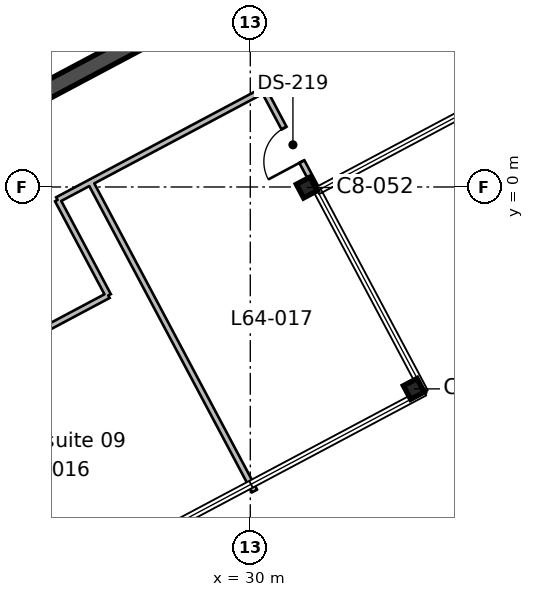
"""IFC4 building model, lengths in metres.
Left out: names, types, materials, properties, quantities, classifications, styles, units other than length and angle.
Written with IfcOpenShell. Run it as: python <this file> out.ifc"""

import sys

from ifc_helpers import new_model, si_unit, direction, frame, frame_2d, origin, origin_2d, place, context, subcontext, project, spatial, rectangle, i_section, extrude, element, fill, save


model = new_model("IFC4")
c1 = context("Model", 3, precision=1e-05, world=origin(), true_north=direction((0.0, 1.0)))
c2 = subcontext(c1, "Body", "Model", "MODEL_VIEW")
j1 = project(units=[si_unit("LENGTHUNIT", "METRE"), si_unit("PLANEANGLEUNIT", "RADIAN")], contexts=[c1])
p1 = place(None, origin())
s1 = spatial("IfcSite", under=j1, at=p1, CompositionType="ELEMENT")
p2 = place(p1, origin())
s2 = spatial("IfcBuilding", under=s1, at=p2, CompositionType="ELEMENT")
p3 = place(p2, frame((0.0, 0.0, 285.3)))
s3 = spatial("IfcBuildingStorey", under=s2, at=p3, CompositionType="ELEMENT", Elevation=285.3)
for number, where, z_axis, x_axis in (
    (1, (34.304, -5.312, 0.0), (0.0, 0.0, 1.0), (-0.469, 0.883, 0.0)),
    (2, (31.487, -0.014, 0.0), (0.0, 0.0, 1.0), (0.883, 0.469, 0.0)),
):
    element("IfcColumn", number, at=place(p3, frame(where, z_axis=z_axis, x_axis=x_axis)), inside=s3, PredefinedType="COLUMN", context=c2, shape_type="SweptSolid", body=[
        extrude(i_section(OverallWidth=0.404, OverallDepth=0.406, WebThickness=0.027, FlangeThickness=0.044, FilletRadius=0.015, at=origin_2d()), origin(), (0.0, 0.0, 1.0), 3.9),
    ])
p4 = place(p3, frame((19.3, -0.299, 0.0), z_axis=(0.0, 0.0, 1.0), x_axis=(0.88295276571, 0.46946183394, 0.0)))
e3 = element("IfcWall", 3, at=p4, inside=s3, PredefinedType="SHEAR", context=c2, shape_type="SweptSolid", body=[
    extrude(rectangle(XDim=20.2, YDim=0.45, at=frame_2d((10.1, 0.0))), origin(), (0.0, 0.0, 1.0), 3.9),
])
p5 = place(p3, frame((24.928, -0.341, 0.0), z_axis=(0.0, 0.0, 1.0), x_axis=(0.469412363336, -0.882979067219, 0.0)))
e4 = element("IfcWall", 4, at=p5, inside=s3, PredefinedType="PARTITIONING", context=c2, shape_type="SweptSolid", body=[
    extrude(rectangle(XDim=2.846, YDim=0.15, at=frame_2d((1.423, 0.0))), origin(), (0.0, 0.0, 1.0), 3.54),
])
p6 = place(p3, frame((26.264, -2.854, 0.0), z_axis=(0.0, 0.0, 1.0), x_axis=(-0.882948799319, -0.469469293757, 0.0)))
e5 = element("IfcWall", 5, at=p6, inside=s3, PredefinedType="PARTITIONING", context=c2, shape_type="SweptSolid", body=[
    extrude(rectangle(XDim=13.696, YDim=0.15, at=frame_2d((6.848, 0.0))), origin(), (0.0, 0.0, 1.0), 3.54),
])
p7 = place(p6, frame((6.35, 0.0, 0.0)))
e6 = element("IfcOpeningElement", 6, at=p7, cuts=e5, PredefinedType="OPENING", context=c2, shape_type="SweptSolid", body=[
    extrude(rectangle(XDim=1.0, YDim=2.1, at=frame_2d((0.5, 1.05))), frame((0.0, 0.085, 0.0), z_axis=(0.0, -1.0, 0.0), x_axis=(1.0, 0.0, 0.0)), (0.0, 0.0, 1.0), 0.17),
])
p8 = place(p3, frame((25.795, 0.124, 0.0), z_axis=(0.0, 0.0, 1.0), x_axis=(0.469388053954, -0.882991990227, 0.0)))
e7 = element("IfcWall", 7, at=p8, inside=s3, PredefinedType="PARTITIONING", context=c2, shape_type="SweptSolid", body=[
    extrude(rectangle(XDim=9.199, YDim=0.15, at=frame_2d((4.6, 0.0))), origin(), (0.0, 0.0, 1.0), 3.54),
])
p9 = place(p3, frame((31.897, -0.347, 0.0), z_axis=(0.0, 0.0, 1.0), x_axis=(-0.469630247772, 0.882863200263, 0.0)))
e8 = element("IfcWall", 8, at=p9, inside=s3, PredefinedType="PARTITIONING", context=c2, shape_type="SweptSolid", body=[
    extrude(rectangle(XDim=3.281, YDim=0.15, at=frame_2d((1.641, 0.0))), origin(), (0.0, 0.0, 1.0), 3.54),
])
p10 = place(p9, frame((1.15, 0.0, 0.0)))
e9 = element("IfcOpeningElement", 9, at=p10, cuts=e8, PredefinedType="OPENING", context=c2, shape_type="SweptSolid", body=[
    extrude(rectangle(XDim=1.0, YDim=2.1, at=frame_2d((0.5, 1.05))), frame((0.0, 0.085, 0.0), z_axis=(0.0, -1.0, 0.0), x_axis=(1.0, 0.0, 0.0)), (0.0, 0.0, 1.0), 0.17),
])
p11 = place(p3, frame((30.356, 2.55, 0.0), z_axis=(0.0, 0.0, 1.0), x_axis=(-0.882959926014, -0.46944836676, 0.0)))
e10 = element("IfcWall", 10, at=p11, inside=s3, PredefinedType="PARTITIONING", context=c2, shape_type="SweptSolid", body=[
    extrude(rectangle(XDim=6.15, YDim=0.15, at=frame_2d((3.075, 0.0))), origin(), (0.0, 0.0, 1.0), 3.54),
])
p12 = place(p10, origin())
e11 = element("IfcDoor", 11, at=p12, inside=s3, OperationType="SINGLE_SWING_LEFT", PredefinedType="DOOR", context=c2, shape_type="SweptSolid", body=[
    extrude(rectangle(XDim=1.0, YDim=2.1, at=frame_2d((0.5, 1.05))), frame((0.0, 0.025, 0.0), z_axis=(0.0, -1.0, 0.0), x_axis=(1.0, 0.0, 0.0)), (0.0, 0.0, 1.0), 0.05),
])
fill(e9, e11)
save(model, sys.argv[1])
